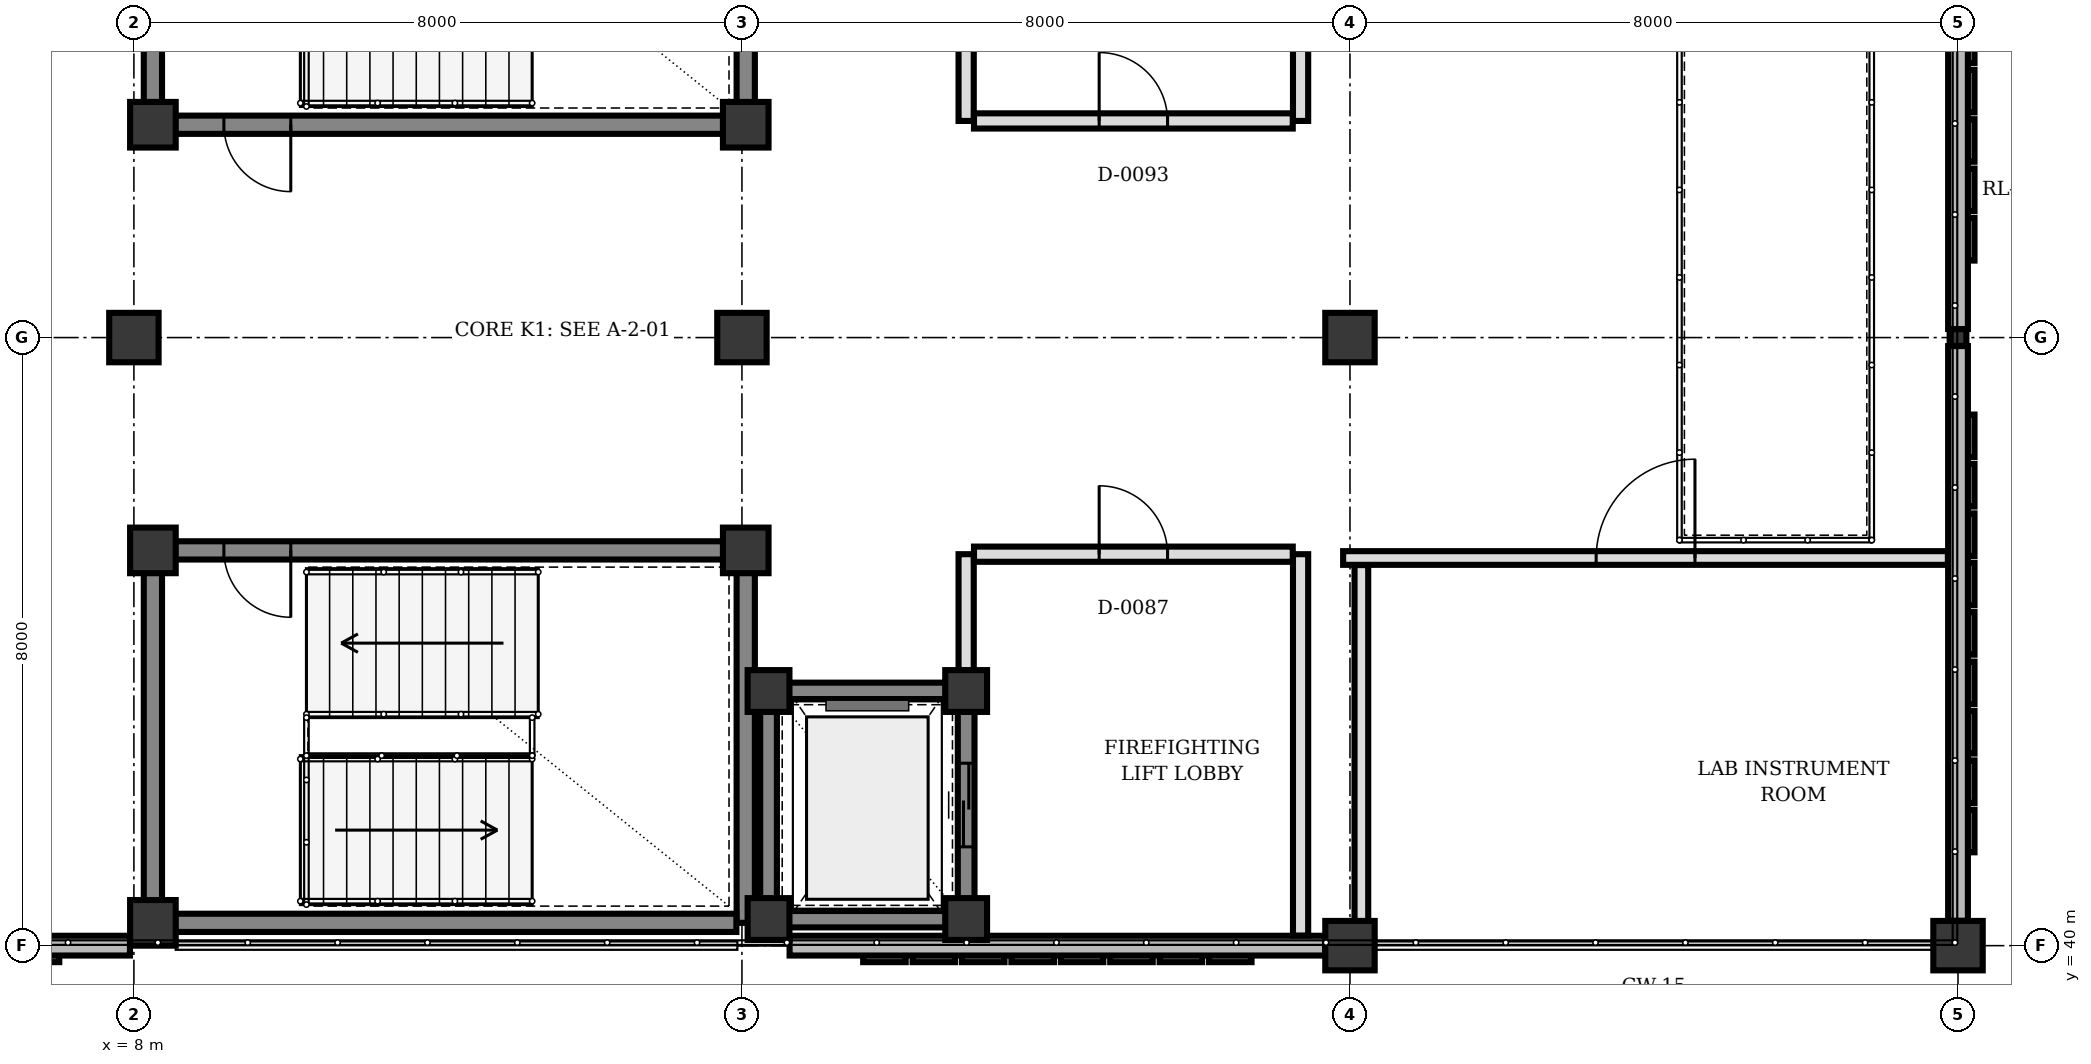
"""IFC4 building model, lengths in metres.
Left out: names, types, materials, properties, quantities, classifications, styles, units other than length and angle.
Written with IfcOpenShell. Run it as: python <this file> out.ifc"""

import sys

from ifc_helpers import new_model, si_unit, direction, frame, frame_2d, origin, origin_2d, place, context, subcontext, project, spatial, rectangle, hollow_rectangle, extrude, element, fill, save


model = new_model("IFC4")
c1 = context("Model", 3, precision=1e-05, world=origin(), true_north=direction((0.0, 1.0)))
c2 = subcontext(c1, "Body", "Model", "MODEL_VIEW")
j1 = project(units=[si_unit("LENGTHUNIT", "METRE"), si_unit("PLANEANGLEUNIT", "RADIAN")], contexts=[c1])
p1 = place(None, origin())
s1 = spatial("IfcSite", under=j1, at=p1, CompositionType="ELEMENT")
p2 = place(p1, origin())
s2 = spatial("IfcBuilding", under=s1, at=p2, CompositionType="ELEMENT")
p3 = place(p2, frame((0.0, 0.0, 8.5)))
s3 = spatial("IfcBuildingStorey", under=s2, at=p3, CompositionType="ELEMENT", Elevation=8.5)
for number, where, z_axis, x_axis in (
    (1, (8.25, 40.3, 0.0), (0.0, 0.0, 1.0), (1.0, 0.0, 0.0)),
    (2, (16.05, 45.2, 0.0), (0.0, 0.0, 1.0), (1.0, 0.0, 0.0)),
    (3, (8.25, 45.2, 0.0), (0.0, 0.0, 1.0), (1.0, 0.0, 0.0)),
    (4, (8.25, 50.8, 0.0), (0.0, 0.0, 1.0), (1.0, 0.0, 0.0)),
    (5, (16.05, 50.8, 0.0), (0.0, 0.0, 1.0), (1.0, 0.0, 0.0)),
):
    element("IfcColumn", number, at=place(p3, frame(where, z_axis=z_axis, x_axis=x_axis)), inside=s3, PredefinedType="COLUMN", context=c2, shape_type="SweptSolid", body=[
        extrude(rectangle(XDim=0.6, YDim=0.6, at=origin_2d()), origin(), (0.0, 0.0, 1.0), 4.0),
    ])
for number, where, z_axis, x_axis in (
    (6, (16.35, 40.35, 0.0), (0.0, 0.0, 1.0), (1.0, 0.0, 0.0)),
    (7, (18.95, 40.35, 0.0), (0.0, 0.0, 1.0), (1.0, 0.0, 0.0)),
    (8, (18.95, 43.35, 0.0), (0.0, 0.0, 1.0), (1.0, 0.0, 0.0)),
    (9, (16.35, 43.35, 0.0), (0.0, 0.0, 1.0), (1.0, 0.0, 0.0)),
):
    element("IfcColumn", number, at=place(p3, frame(where, z_axis=z_axis, x_axis=x_axis)), inside=s3, PredefinedType="COLUMN", context=c2, shape_type="SweptSolid", body=[
        extrude(rectangle(XDim=0.55, YDim=0.55, at=origin_2d()), origin(), (0.0, 0.0, 1.0), 4.0),
    ])
for number, where, z_axis, x_axis in (
    (10, (16.0, 48.0, 0.0), (0.0, 0.0, 1.0), (1.0, 0.0, 0.0)),
    (11, (24.0, 40.0, 0.0), (0.0, 0.0, 1.0), (1.0, 0.0, 0.0)),
    (12, (24.0, 48.0, 0.0), (0.0, 0.0, 1.0), (1.0, 0.0, 0.0)),
    (13, (32.0, 40.0, 0.0), (0.0, 0.0, 1.0), (1.0, 0.0, 0.0)),
):
    element("IfcColumn", number, at=place(p3, frame(where, z_axis=z_axis, x_axis=x_axis)), inside=s3, PredefinedType="COLUMN", context=c2, shape_type="SweptSolid", body=[
        extrude(rectangle(XDim=0.65, YDim=0.65, at=origin_2d()), origin(), (0.0, 0.0, 1.0), 4.0),
    ])
p4 = place(p3, frame((32.0, 48.0, 0.0), z_axis=(0.0, 0.0, 1.0), x_axis=(1.0, 0.0, 0.0)))
e14 = element("IfcColumn", 14, at=p4, inside=s3, PredefinedType="COLUMN", context=c2, shape_type="SweptSolid", body=[
    extrude(hollow_rectangle(XDim=0.22, YDim=0.22, WallThickness=0.01, at=origin_2d()), origin(), (0.0, 0.0, 1.0), 4.0),
])
p5 = place(p3, frame((8.0, 48.0, 0.0), z_axis=(0.0, 0.0, 1.0), x_axis=(1.0, 0.0, 0.0)))
e15 = element("IfcColumn", 15, at=p5, inside=s3, PredefinedType="COLUMN", context=c2, shape_type="SweptSolid", body=[
    extrude(rectangle(XDim=0.65, YDim=0.65, at=origin_2d()), origin(), (0.0, 0.0, 1.0), 4.0),
])
for number, where, z_axis, x_axis in (
    (16, (32.0, 55.673, 0.0), (0.0, 0.0, 1.0), (0.0, -1.0, 0.0)),
    (17, (32.0, 47.888, 0.0), (0.0, 0.0, 1.0), (0.0, -1.0, 0.0)),
):
    element("IfcWall", number, at=place(p3, frame(where, z_axis=z_axis, x_axis=x_axis)), inside=s3, PredefinedType="SOLIDWALL", context=c2, shape_type="SweptSolid", body=[
        extrude(rectangle(XDim=7.561, YDim=0.26, at=frame_2d((3.781, 0.0))), origin(), (0.0, 0.0, 1.0), 3.152),
    ])
p6 = place(p3, frame((23.673, 40.0, 0.0), z_axis=(0.0, 0.0, 1.0), x_axis=(-1.0, 0.0, 0.0)))
e18 = element("IfcWall", 18, at=p6, inside=s3, PredefinedType="SOLIDWALL", context=c2, shape_type="SweptSolid", body=[
    extrude(rectangle(XDim=7.046, YDim=0.26, at=frame_2d((3.523, 0.0))), origin(), (0.0, 0.0, 1.0), 3.55),
])
p7 = place(p3, frame((7.948, 40.0, 0.0), z_axis=(0.0, 0.0, 1.0), x_axis=(-1.0, 0.0, 0.0)))
e19 = element("IfcWall", 19, at=p7, inside=s3, PredefinedType="SOLIDWALL", context=c2, shape_type="SweptSolid", body=[
    extrude(rectangle(XDim=7.621, YDim=0.26, at=frame_2d((3.811, 0.0))), origin(), (0.0, 0.0, 1.0), 3.55),
])
p8 = place(p7, frame((1.711, 0.0, 0.9)))
e20 = element("IfcOpeningElement", 20, at=p8, cuts=e19, PredefinedType="OPENING", context=c2, shape_type="SweptSolid", body=[
    extrude(rectangle(XDim=1.15, YDim=1.25, at=frame_2d((0.575, 0.625))), frame((0.0, 0.14, 0.0), z_axis=(0.0, -1.0, 0.0), x_axis=(1.0, 0.0, 0.0)), (0.0, 0.0, 1.0), 0.28),
])
p9 = place(p3, frame((8.25, 40.592, 0.0), z_axis=(0.0, 0.0, 1.0), x_axis=(0.0, 1.0, 0.0)))
e21 = element("IfcWall", 21, at=p9, inside=s3, PredefinedType="SHEAR", context=c2, shape_type="SweptSolid", body=[
    extrude(rectangle(XDim=4.316, YDim=0.24, at=frame_2d((2.158, 0.0))), origin(), (0.0, 0.0, 1.0), 3.74),
])
p10 = place(p3, frame((16.05, 44.908, 0.0), z_axis=(0.0, 0.0, 1.0), x_axis=(0.0, -1.0, 0.0)))
e22 = element("IfcWall", 22, at=p10, inside=s3, PredefinedType="SHEAR", context=c2, shape_type="SweptSolid", body=[
    extrude(rectangle(XDim=4.608, YDim=0.24, at=frame_2d((2.304, 0.0))), origin(), (0.0, 0.0, 1.0), 3.74),
])
p11 = place(p3, frame((15.927, 40.3, 0.0), z_axis=(0.0, 0.0, 1.0), x_axis=(-1.0, 0.0, 0.0)))
e23 = element("IfcWall", 23, at=p11, inside=s3, PredefinedType="SHEAR", context=c2, shape_type="SweptSolid", body=[
    extrude(rectangle(XDim=7.385, YDim=0.24, at=frame_2d((3.692, 0.0))), origin(), (0.0, 0.0, 1.0), 3.74),
])
p12 = place(p3, frame((15.758, 45.2, 0.0), z_axis=(0.0, 0.0, 1.0), x_axis=(-1.0, 0.0, 0.0)))
e24 = element("IfcWall", 24, at=p12, inside=s3, PredefinedType="SHEAR", context=c2, shape_type="SweptSolid", body=[
    extrude(rectangle(XDim=7.216, YDim=0.24, at=frame_2d((3.608, 0.0))), origin(), (0.0, 0.0, 1.0), 3.74),
])
p13 = place(p12, frame((5.694, 0.0, 0.0)))
e25 = element("IfcOpeningElement", 25, at=p13, cuts=e24, PredefinedType="OPENING", context=c2, shape_type="SweptSolid", body=[
    extrude(rectangle(XDim=0.88, YDim=2.1, at=frame_2d((0.44, 1.05))), frame((0.0, 0.13, 0.0), z_axis=(0.0, -1.0, 0.0), x_axis=(1.0, 0.0, 0.0)), (0.0, 0.0, 1.0), 0.26),
])
p14 = place(p3, frame((8.25, 51.092, 0.0), z_axis=(0.0, 0.0, 1.0), x_axis=(0.0, 1.0, 0.0)))
e26 = element("IfcWall", 26, at=p14, inside=s3, PredefinedType="SHEAR", context=c2, shape_type="SweptSolid", body=[
    extrude(rectangle(XDim=4.316, YDim=0.24, at=frame_2d((2.158, 0.0))), origin(), (0.0, 0.0, 1.0), 3.74),
])
p15 = place(p3, frame((16.05, 55.7, 0.0), z_axis=(0.0, 0.0, 1.0), x_axis=(0.0, -1.0, 0.0)))
e27 = element("IfcWall", 27, at=p15, inside=s3, PredefinedType="SHEAR", context=c2, shape_type="SweptSolid", body=[
    extrude(rectangle(XDim=4.608, YDim=0.24, at=frame_2d((2.304, 0.0))), origin(), (0.0, 0.0, 1.0), 3.74),
])
p16 = place(p3, frame((15.758, 50.8, 0.0), z_axis=(0.0, 0.0, 1.0), x_axis=(-1.0, 0.0, 0.0)))
e28 = element("IfcWall", 28, at=p16, inside=s3, PredefinedType="SHEAR", context=c2, shape_type="SweptSolid", body=[
    extrude(rectangle(XDim=7.216, YDim=0.24, at=frame_2d((3.608, 0.0))), origin(), (0.0, 0.0, 1.0), 3.74),
])
p17 = place(p16, frame((5.694, 0.0, 0.0)))
e29 = element("IfcOpeningElement", 29, at=p17, cuts=e28, PredefinedType="OPENING", context=c2, shape_type="SweptSolid", body=[
    extrude(rectangle(XDim=0.88, YDim=2.1, at=frame_2d((0.44, 1.05))), frame((0.0, 0.13, 0.0), z_axis=(0.0, -1.0, 0.0), x_axis=(1.0, 0.0, 0.0)), (0.0, 0.0, 1.0), 0.26),
])
p18 = place(p3, frame((16.617, 40.35, 0.0), z_axis=(0.0, 0.0, 1.0), x_axis=(1.0, 0.0, 0.0)))
e30 = element("IfcWall", 30, at=p18, inside=s3, PredefinedType="SHEAR", context=c2, shape_type="SweptSolid", body=[
    extrude(rectangle(XDim=2.066, YDim=0.22, at=frame_2d((1.033, 0.0))), origin(), (0.0, 0.0, 1.0), 3.74),
])
p19 = place(p3, frame((18.95, 40.617, 0.0), z_axis=(0.0, 0.0, 1.0), x_axis=(0.0, 1.0, 0.0)))
e31 = element("IfcWall", 31, at=p19, inside=s3, PredefinedType="SHEAR", context=c2, shape_type="SweptSolid", body=[
    extrude(rectangle(XDim=2.466, YDim=0.22, at=frame_2d((1.233, 0.0))), origin(), (0.0, 0.0, 1.0), 3.74),
])
p20 = place(p19, frame((0.683, 0.0, 0.0)))
e32 = element("IfcOpeningElement", 32, at=p20, cuts=e31, PredefinedType="OPENING", context=c2, shape_type="SweptSolid", body=[
    extrude(rectangle(XDim=1.1, YDim=2.15, at=frame_2d((0.55, 1.075))), frame((0.0, 0.12, 0.0), z_axis=(0.0, -1.0, 0.0), x_axis=(1.0, 0.0, 0.0)), (0.0, 0.0, 1.0), 0.24),
])
p21 = place(p3, frame((18.683, 43.35, 0.0), z_axis=(0.0, 0.0, 1.0), x_axis=(-1.0, 0.0, 0.0)))
e33 = element("IfcWall", 33, at=p21, inside=s3, PredefinedType="SHEAR", context=c2, shape_type="SweptSolid", body=[
    extrude(rectangle(XDim=2.066, YDim=0.22, at=frame_2d((1.033, 0.0))), origin(), (0.0, 0.0, 1.0), 3.74),
])
p22 = place(p3, frame((16.35, 43.083, 0.0), z_axis=(0.0, 0.0, 1.0), x_axis=(0.0, -1.0, 0.0)))
e34 = element("IfcWall", 34, at=p22, inside=s3, PredefinedType="SHEAR", context=c2, shape_type="SweptSolid", body=[
    extrude(rectangle(XDim=2.466, YDim=0.22, at=frame_2d((1.233, 0.0))), origin(), (0.0, 0.0, 1.0), 3.74),
])
p23 = place(p3, frame((18.95, 43.617, 0.0), z_axis=(0.0, 0.0, 1.0), x_axis=(0.0, 1.0, 0.0)))
e35 = element("IfcWall", 35, at=p23, inside=s3, PredefinedType="PARTITIONING", context=c2, shape_type="SweptSolid", body=[
    extrude(rectangle(XDim=1.533, YDim=0.2, at=frame_2d((0.767, 0.0))), origin(), (0.0, 0.0, 1.0), 3.7),
])
p24 = place(p3, frame((23.35, 40.133, 0.0), z_axis=(0.0, 0.0, 1.0), x_axis=(0.0, 1.0, 0.0)))
e36 = element("IfcWall", 36, at=p24, inside=s3, PredefinedType="PARTITIONING", context=c2, shape_type="SweptSolid", body=[
    extrude(rectangle(XDim=5.017, YDim=0.2, at=frame_2d((2.508, 0.0))), origin(), (0.0, 0.0, 1.0), 3.7),
])
p25 = place(p3, frame((19.053, 45.15, 0.0), z_axis=(0.0, 0.0, 1.0), x_axis=(1.0, 0.0, 0.0)))
e37 = element("IfcWall", 37, at=p25, inside=s3, PredefinedType="PARTITIONING", context=c2, shape_type="SweptSolid", body=[
    extrude(rectangle(XDim=4.194, YDim=0.2, at=frame_2d((2.097, 0.0))), origin(), (0.0, 0.0, 1.0), 3.7),
])
p26 = place(p25, frame((1.647, 0.0, 0.0)))
e38 = element("IfcOpeningElement", 38, at=p26, cuts=e37, PredefinedType="OPENING", context=c2, shape_type="SweptSolid", body=[
    extrude(rectangle(XDim=0.9, YDim=2.2, at=frame_2d((0.45, 1.1))), frame((0.0, 0.11, 0.0), z_axis=(0.0, -1.0, 0.0), x_axis=(1.0, 0.0, 0.0)), (0.0, 0.0, 1.0), 0.22),
])
p27 = place(p3, frame((18.95, 50.85, 0.0), z_axis=(0.0, 0.0, 1.0), x_axis=(0.0, 1.0, 0.0)))
e39 = element("IfcWall", 39, at=p27, inside=s3, PredefinedType="PARTITIONING", context=c2, shape_type="SweptSolid", body=[
    extrude(rectangle(XDim=1.533, YDim=0.2, at=frame_2d((0.767, 0.0))), origin(), (0.0, 0.0, 1.0), 3.7),
])
p28 = place(p3, frame((23.35, 50.85, 0.0), z_axis=(0.0, 0.0, 1.0), x_axis=(0.0, 1.0, 0.0)))
e40 = element("IfcWall", 40, at=p28, inside=s3, PredefinedType="PARTITIONING", context=c2, shape_type="SweptSolid", body=[
    extrude(rectangle(XDim=4.8, YDim=0.2, at=frame_2d((2.4, 0.0))), origin(), (0.0, 0.0, 1.0), 3.7),
])
p29 = place(p3, frame((19.053, 50.85, 0.0), z_axis=(0.0, 0.0, 1.0), x_axis=(1.0, 0.0, 0.0)))
e41 = element("IfcWall", 41, at=p29, inside=s3, PredefinedType="PARTITIONING", context=c2, shape_type="SweptSolid", body=[
    extrude(rectangle(XDim=4.194, YDim=0.2, at=frame_2d((2.097, 0.0))), origin(), (0.0, 0.0, 1.0), 3.7),
])
p30 = place(p29, frame((1.647, 0.0, 0.0)))
e42 = element("IfcOpeningElement", 42, at=p30, cuts=e41, PredefinedType="OPENING", context=c2, shape_type="SweptSolid", body=[
    extrude(rectangle(XDim=0.9, YDim=2.2, at=frame_2d((0.45, 1.1))), frame((0.0, 0.11, 0.0), z_axis=(0.0, -1.0, 0.0), x_axis=(1.0, 0.0, 0.0)), (0.0, 0.0, 1.0), 0.22),
])
p31 = place(p3, frame((23.91, 45.1, 0.0), z_axis=(0.0, 0.0, 1.0), x_axis=(1.0, 0.0, 0.0)))
e43 = element("IfcWall", 43, at=p31, inside=s3, PredefinedType="PARTITIONING", context=c2, shape_type="SweptSolid", body=[
    extrude(rectangle(XDim=7.957, YDim=0.18, at=frame_2d((3.979, 0.0))), origin(), (0.0, 0.0, 1.0), 3.152),
])
p32 = place(p31, frame((3.329, 0.0, 0.0)))
e44 = element("IfcOpeningElement", 44, at=p32, cuts=e43, PredefinedType="OPENING", context=c2, shape_type="SweptSolid", body=[
    extrude(rectangle(XDim=1.3, YDim=2.28, at=frame_2d((0.65, 1.14))), frame((0.0, 0.1, 0.0), z_axis=(0.0, -1.0, 0.0), x_axis=(1.0, 0.0, 0.0)), (0.0, 0.0, 1.0), 0.2),
])
p33 = place(p3, frame((24.15, 40.317, 0.0), z_axis=(0.0, 0.0, 1.0), x_axis=(0.0, 1.0, 0.0)))
e45 = element("IfcWall", 45, at=p33, inside=s3, PredefinedType="PARTITIONING", context=c2, shape_type="SweptSolid", body=[
    extrude(rectangle(XDim=4.69, YDim=0.18, at=frame_2d((2.345, 0.0))), origin(), (0.0, 0.0, 1.0), 3.002),
])
p34 = place(p13, origin())
e46 = element("IfcDoor", 46, at=p34, inside=s3, OperationType="SINGLE_SWING_LEFT", PredefinedType="DOOR", context=c2, shape_type="SweptSolid", body=[
    extrude(rectangle(XDim=0.88, YDim=2.1, at=frame_2d((0.44, 1.05))), frame((0.0, 0.025, 0.0), z_axis=(0.0, -1.0, 0.0), x_axis=(1.0, 0.0, 0.0)), (0.0, 0.0, 1.0), 0.05),
])
fill(e25, e46)
p35 = place(p17, origin())
e47 = element("IfcDoor", 47, at=p35, inside=s3, OperationType="SINGLE_SWING_LEFT", PredefinedType="DOOR", context=c2, shape_type="SweptSolid", body=[
    extrude(rectangle(XDim=0.88, YDim=2.1, at=frame_2d((0.44, 1.05))), frame((0.0, 0.025, 0.0), z_axis=(0.0, -1.0, 0.0), x_axis=(1.0, 0.0, 0.0)), (0.0, 0.0, 1.0), 0.05),
])
fill(e29, e47)
p36 = place(p20, origin())
e48 = element("IfcDoor", 48, at=p36, inside=s3, OperationType="DOUBLE_DOOR_SLIDING", PredefinedType="DOOR", context=c2, shape_type="SweptSolid", body=[
    extrude(rectangle(XDim=1.1, YDim=2.15, at=frame_2d((0.55, 1.075))), frame((0.0, 0.025, 0.0), z_axis=(0.0, -1.0, 0.0), x_axis=(1.0, 0.0, 0.0)), (0.0, 0.0, 1.0), 0.05),
])
fill(e32, e48)
p37 = place(p26, origin())
e49 = element("IfcDoor", 49, at=p37, inside=s3, OperationType="SINGLE_SWING_LEFT", PredefinedType="DOOR", context=c2, shape_type="SweptSolid", body=[
    extrude(rectangle(XDim=0.9, YDim=2.2, at=frame_2d((0.45, 1.1))), frame((0.0, 0.025, 0.0), z_axis=(0.0, -1.0, 0.0), x_axis=(1.0, 0.0, 0.0)), (0.0, 0.0, 1.0), 0.05),
])
fill(e38, e49)
p38 = place(p30, origin())
e50 = element("IfcDoor", 50, at=p38, inside=s3, OperationType="SINGLE_SWING_LEFT", PredefinedType="DOOR", context=c2, shape_type="SweptSolid", body=[
    extrude(rectangle(XDim=0.9, YDim=2.2, at=frame_2d((0.45, 1.1))), frame((0.0, 0.025, 0.0), z_axis=(0.0, -1.0, 0.0), x_axis=(1.0, 0.0, 0.0)), (0.0, 0.0, 1.0), 0.05),
])
fill(e42, e50)
p39 = place(p32, origin())
e51 = element("IfcDoor", 51, at=p39, inside=s3, OperationType="SINGLE_SWING_RIGHT", PredefinedType="DOOR", context=c2, shape_type="SweptSolid", body=[
    extrude(rectangle(XDim=1.3, YDim=2.28, at=frame_2d((0.65, 1.14))), frame((0.0, 0.025, 0.0), z_axis=(0.0, -1.0, 0.0), x_axis=(1.0, 0.0, 0.0)), (0.0, 0.0, 1.0), 0.05),
])
fill(e44, e51)
save(model, sys.argv[1])
